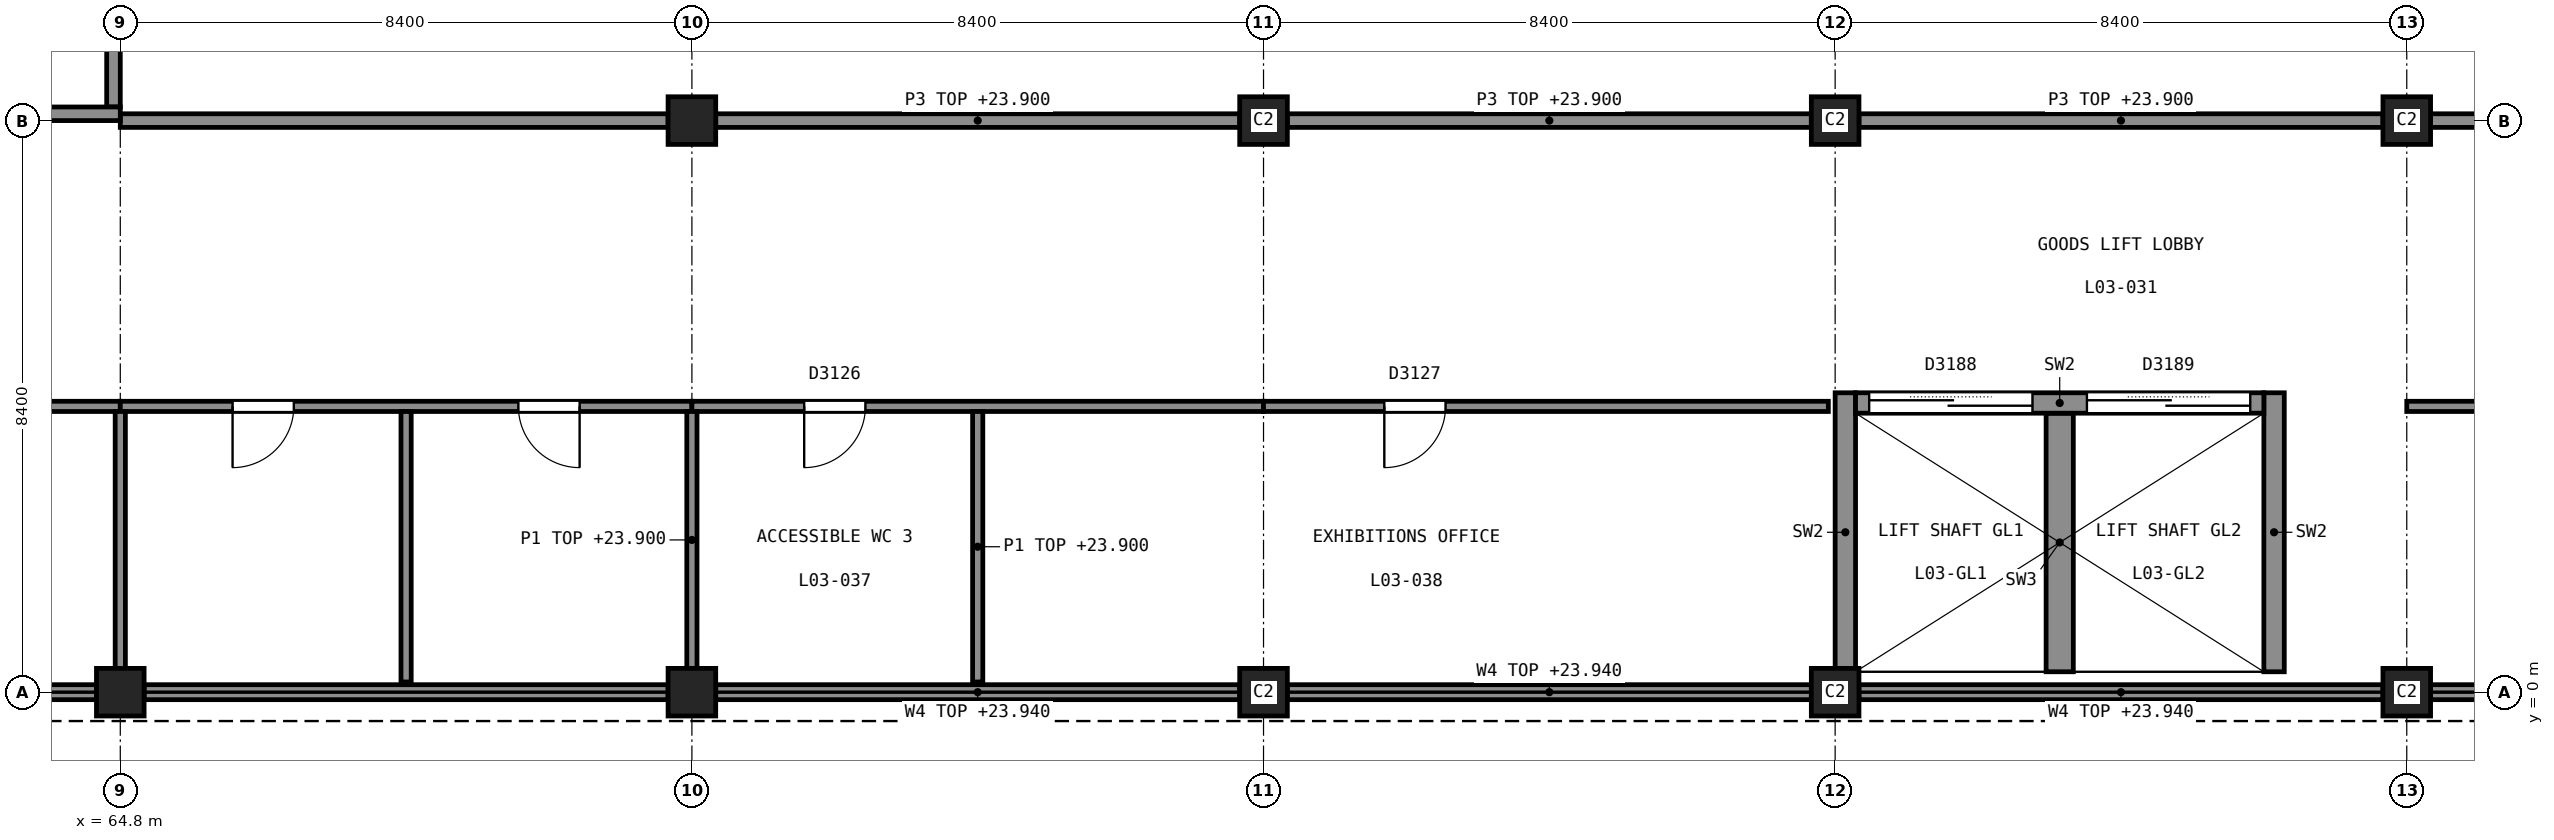
"""IFC4 building model, lengths in metres.
Left out: names, types, materials, properties, quantities, classifications, styles, units other than length and angle.
Written with IfcOpenShell. Run it as: python <this file> out.ifc"""

import sys

from ifc_helpers import new_model, si_unit, direction, frame, frame_2d, origin, origin_2d, place, context, subcontext, project, spatial, rectangle, extrude, element, fill, save


model = new_model("IFC4")
c1 = context("Model", 3, precision=1e-05, world=origin(), true_north=direction((0.0, 1.0)))
c2 = subcontext(c1, "Body", "Model", "MODEL_VIEW")
j1 = project(units=[si_unit("LENGTHUNIT", "METRE"), si_unit("PLANEANGLEUNIT", "RADIAN")], contexts=[c1])
p1 = place(None, origin())
s1 = spatial("IfcSite", under=j1, at=p1, CompositionType="ELEMENT")
p2 = place(p1, origin())
s2 = spatial("IfcBuilding", under=s1, at=p2, CompositionType="ELEMENT")
p3 = place(p2, frame((0.0, 0.0, 20.0)))
s3 = spatial("IfcBuildingStorey", under=s2, at=p3, CompositionType="ELEMENT", Elevation=20.0)
p4 = place(p3, frame((56.4, 8.5, 0.0), z_axis=(0.0, 0.0, 1.0), x_axis=(1.0, 0.0, 0.0)))
e1 = element("IfcWall", 1, at=p4, inside=s3, PredefinedType="SHEAR", context=c2, shape_type="SweptSolid", body=[
    extrude(rectangle(XDim=8.4, YDim=0.2, at=frame_2d((4.2, 0.0))), origin(), (0.0, 0.0, 1.0), 5.0),
])
p5 = place(p4, frame((3.3, 0.0, 0.0)))
e2 = element("IfcOpeningElement", 2, at=p5, cuts=e1, PredefinedType="OPENING", context=c2, shape_type="SweptSolid", body=[
    extrude(rectangle(XDim=1.8, YDim=2.1, at=frame_2d((0.9, 1.05))), frame((0.0, 0.11, 0.0), z_axis=(0.0, -1.0, 0.0), x_axis=(1.0, 0.0, 0.0)), (0.0, 0.0, 1.0), 0.22),
])
p6 = place(p3, frame((64.7, 8.6, 0.0), z_axis=(0.0, 0.0, 1.0), x_axis=(0.0, 1.0, 0.0)))
e3 = element("IfcWall", 3, at=p6, inside=s3, PredefinedType="SHEAR", context=c2, shape_type="SweptSolid", body=[
    extrude(rectangle(XDim=8.0, YDim=0.2, at=frame_2d((4.0, 0.0))), origin(), (0.0, 0.0, 1.0), 5.0),
])
for number, where, z_axis, x_axis in (
    (4, (90.15, 0.3, 0.0), (0.0, 0.0, 1.0), (0.0, 1.0, 0.0)),
    (5, (96.45, 0.3, 0.0), (0.0, 0.0, 1.0), (0.0, 1.0, 0.0)),
):
    element("IfcWall", number, at=place(p3, frame(where, z_axis=z_axis, x_axis=x_axis)), inside=s3, PredefinedType="SHEAR", context=c2, shape_type="SweptSolid", body=[
        extrude(rectangle(XDim=4.1, YDim=0.3, at=frame_2d((2.05, 0.0))), origin(), (0.0, 0.0, 1.0), 5.0),
    ])
p7 = place(p3, frame((90.3, 4.25, 0.0), z_axis=(0.0, 0.0, 1.0), x_axis=(1.0, 0.0, 0.0)))
e6 = element("IfcWall", 6, at=p7, inside=s3, PredefinedType="SHEAR", context=c2, shape_type="SweptSolid", body=[
    extrude(rectangle(XDim=6.0, YDim=0.3, at=frame_2d((3.0, 0.0))), origin(), (0.0, 0.0, 1.0), 5.0),
])
p8 = place(p7, frame((0.2, 0.0, 0.0)))
e7 = element("IfcOpeningElement", 7, at=p8, cuts=e6, PredefinedType="OPENING", context=c2, shape_type="SweptSolid", body=[
    extrude(rectangle(XDim=2.4, YDim=2.4, at=frame_2d((1.2, 1.2))), frame((0.0, 0.16, 0.0), z_axis=(0.0, -1.0, 0.0), x_axis=(1.0, 0.0, 0.0)), (0.0, 0.0, 1.0), 0.32),
])
p9 = place(p7, frame((3.4, 0.0, 0.0)))
e8 = element("IfcOpeningElement", 8, at=p9, cuts=e6, PredefinedType="OPENING", context=c2, shape_type="SweptSolid", body=[
    extrude(rectangle(XDim=2.4, YDim=2.4, at=frame_2d((1.2, 1.2))), frame((0.0, 0.16, 0.0), z_axis=(0.0, -1.0, 0.0), x_axis=(1.0, 0.0, 0.0)), (0.0, 0.0, 1.0), 0.32),
])
p10 = place(p3, frame((93.3, 0.3, 0.0), z_axis=(0.0, 0.0, 1.0), x_axis=(0.0, 1.0, 0.0)))
e9 = element("IfcWall", 9, at=p10, inside=s3, PredefinedType="SHEAR", context=c2, shape_type="SweptSolid", body=[
    extrude(rectangle(XDim=3.8, YDim=0.4, at=frame_2d((1.9, 0.0))), origin(), (0.0, 0.0, 1.0), 5.0),
])
for number, where, z_axis, x_axis in (
    (10, (64.8, 0.0, 0.0), (0.0, 0.0, 1.0), (1.0, 0.0, 0.0)),
    (11, (73.2, 0.0, 0.0), (0.0, 0.0, 1.0), (1.0, 0.0, 0.0)),
    (12, (73.2, 8.4, 0.0), (0.0, 0.0, 1.0), (1.0, 0.0, 0.0)),
    (13, (81.6, 0.0, 0.0), (0.0, 0.0, 1.0), (1.0, 0.0, 0.0)),
    (14, (81.6, 8.4, 0.0), (0.0, 0.0, 1.0), (1.0, 0.0, 0.0)),
    (15, (90.0, 0.0, 0.0), (0.0, 0.0, 1.0), (1.0, 0.0, 0.0)),
    (16, (90.0, 8.4, 0.0), (0.0, 0.0, 1.0), (1.0, 0.0, 0.0)),
    (17, (98.4, 0.0, 0.0), (0.0, 0.0, 1.0), (1.0, 0.0, 0.0)),
    (18, (98.4, 8.4, 0.0), (0.0, 0.0, 1.0), (1.0, 0.0, 0.0)),
):
    element("IfcColumn", number, at=place(p3, frame(where, z_axis=z_axis, x_axis=x_axis)), inside=s3, PredefinedType="COLUMN", context=c2, shape_type="SweptSolid", body=[
        extrude(rectangle(XDim=0.7, YDim=0.7, at=origin_2d()), origin(), (0.0, 0.0, 1.0), 5.0),
    ])
p11 = place(p3, frame((56.75, 0.0, 0.0), z_axis=(0.0, 0.0, 1.0), x_axis=(1.0, 0.0, 0.0)))
e19 = element("IfcWall", 19, at=p11, inside=s3, PredefinedType="SOLIDWALL", context=c2, shape_type="SweptSolid", body=[
    extrude(rectangle(XDim=7.7, YDim=0.22, at=frame_2d((3.85, 0.0))), origin(), (0.0, 0.0, 1.0), 3.94),
])
p12 = place(p3, frame((65.15, 0.0, 0.0), z_axis=(0.0, 0.0, 1.0), x_axis=(1.0, 0.0, 0.0)))
e20 = element("IfcWall", 20, at=p12, inside=s3, PredefinedType="SOLIDWALL", context=c2, shape_type="SweptSolid", body=[
    extrude(rectangle(XDim=7.7, YDim=0.22, at=frame_2d((3.85, 0.0))), origin(), (0.0, 0.0, 1.0), 3.94),
])
for number, where, z_axis, x_axis in (
    (21, (73.55, 0.0, 0.0), (0.0, 0.0, 1.0), (1.0, 0.0, 0.0)),
    (22, (81.95, 0.0, 0.0), (0.0, 0.0, 1.0), (1.0, 0.0, 0.0)),
    (23, (90.35, 0.0, 0.0), (0.0, 0.0, 1.0), (1.0, 0.0, 0.0)),
    (24, (98.75, 0.0, 0.0), (0.0, 0.0, 1.0), (1.0, 0.0, 0.0)),
):
    element("IfcWall", number, at=place(p3, frame(where, z_axis=z_axis, x_axis=x_axis)), inside=s3, PredefinedType="SOLIDWALL", context=c2, shape_type="SweptSolid", body=[
        extrude(rectangle(XDim=7.7, YDim=0.22, at=frame_2d((3.85, 0.0))), origin(), (0.0, 0.0, 1.0), 3.94),
    ])
p13 = place(p3, frame((64.8, 8.4, 0.0), z_axis=(0.0, 0.0, 1.0), x_axis=(1.0, 0.0, 0.0)))
e25 = element("IfcWall", 25, at=p13, inside=s3, PredefinedType="PARTITIONING", context=c2, shape_type="SweptSolid", body=[
    extrude(rectangle(XDim=8.05, YDim=0.2, at=frame_2d((4.025, 0.0))), origin(), (0.0, 0.0, 1.0), 3.9),
])
for number, where, z_axis, x_axis in (
    (26, (73.55, 8.4, 0.0), (0.0, 0.0, 1.0), (1.0, 0.0, 0.0)),
    (27, (81.95, 8.4, 0.0), (0.0, 0.0, 1.0), (1.0, 0.0, 0.0)),
    (28, (90.35, 8.4, 0.0), (0.0, 0.0, 1.0), (1.0, 0.0, 0.0)),
    (29, (98.75, 8.4, 0.0), (0.0, 0.0, 1.0), (1.0, 0.0, 0.0)),
):
    element("IfcWall", number, at=place(p3, frame(where, z_axis=z_axis, x_axis=x_axis)), inside=s3, PredefinedType="PARTITIONING", context=c2, shape_type="SweptSolid", body=[
        extrude(rectangle(XDim=7.7, YDim=0.2, at=frame_2d((3.85, 0.0))), origin(), (0.0, 0.0, 1.0), 3.9),
    ])
p14 = place(p3, frame((98.4, 4.2, 0.0), z_axis=(0.0, 0.0, 1.0), x_axis=(1.0, 0.0, 0.0)))
e30 = element("IfcWall", 30, at=p14, inside=s3, PredefinedType="PARTITIONING", context=c2, shape_type="SweptSolid", body=[
    extrude(rectangle(XDim=8.4, YDim=0.15, at=frame_2d((4.2, 0.0))), origin(), (0.0, 0.0, 1.0), 3.9),
])
p15 = place(p14, frame((5.725, 0.0, 0.0)))
e31 = element("IfcOpeningElement", 31, at=p15, cuts=e30, PredefinedType="OPENING", context=c2, shape_type="SweptSolid", body=[
    extrude(rectangle(XDim=0.9, YDim=2.1, at=frame_2d((0.45, 1.05))), frame((0.0, 0.085, 0.0), z_axis=(0.0, -1.0, 0.0), x_axis=(1.0, 0.0, 0.0)), (0.0, 0.0, 1.0), 0.17),
])
p16 = place(p3, frame((56.4, 4.2, 0.0), z_axis=(0.0, 0.0, 1.0), x_axis=(1.0, 0.0, 0.0)))
e32 = element("IfcWall", 32, at=p16, inside=s3, PredefinedType="PARTITIONING", context=c2, shape_type="SweptSolid", body=[
    extrude(rectangle(XDim=8.4, YDim=0.15, at=frame_2d((4.2, 0.0))), origin(), (0.0, 0.0, 1.0), 3.9),
])
p17 = place(p3, frame((64.8, 4.2, 0.0), z_axis=(0.0, 0.0, 1.0), x_axis=(1.0, 0.0, 0.0)))
e33 = element("IfcWall", 33, at=p17, inside=s3, PredefinedType="PARTITIONING", context=c2, shape_type="SweptSolid", body=[
    extrude(rectangle(XDim=8.4, YDim=0.15, at=frame_2d((4.2, 0.0))), origin(), (0.0, 0.0, 1.0), 3.9),
])
p18 = place(p17, frame((1.65, 0.0, 0.0)))
e34 = element("IfcOpeningElement", 34, at=p18, cuts=e33, PredefinedType="OPENING", context=c2, shape_type="SweptSolid", body=[
    extrude(rectangle(XDim=0.9, YDim=2.1, at=frame_2d((0.45, 1.05))), frame((0.0, 0.085, 0.0), z_axis=(0.0, -1.0, 0.0), x_axis=(1.0, 0.0, 0.0)), (0.0, 0.0, 1.0), 0.17),
])
p19 = place(p17, frame((5.85, 0.0, 0.0)))
e35 = element("IfcOpeningElement", 35, at=p19, cuts=e33, PredefinedType="OPENING", context=c2, shape_type="SweptSolid", body=[
    extrude(rectangle(XDim=0.9, YDim=2.1, at=frame_2d((0.45, 1.05))), frame((0.0, 0.085, 0.0), z_axis=(0.0, -1.0, 0.0), x_axis=(1.0, 0.0, 0.0)), (0.0, 0.0, 1.0), 0.17),
])
p20 = place(p3, frame((73.2, 4.2, 0.0), z_axis=(0.0, 0.0, 1.0), x_axis=(1.0, 0.0, 0.0)))
e36 = element("IfcWall", 36, at=p20, inside=s3, PredefinedType="PARTITIONING", context=c2, shape_type="SweptSolid", body=[
    extrude(rectangle(XDim=8.4, YDim=0.15, at=frame_2d((4.2, 0.0))), origin(), (0.0, 0.0, 1.0), 3.9),
])
p21 = place(p20, frame((1.65, 0.0, 0.0)))
e37 = element("IfcOpeningElement", 37, at=p21, cuts=e36, PredefinedType="OPENING", context=c2, shape_type="SweptSolid", body=[
    extrude(rectangle(XDim=0.9, YDim=2.1, at=frame_2d((0.45, 1.05))), frame((0.0, 0.085, 0.0), z_axis=(0.0, -1.0, 0.0), x_axis=(1.0, 0.0, 0.0)), (0.0, 0.0, 1.0), 0.17),
])
p22 = place(p3, frame((81.6, 4.2, 0.0), z_axis=(0.0, 0.0, 1.0), x_axis=(1.0, 0.0, 0.0)))
e38 = element("IfcWall", 38, at=p22, inside=s3, PredefinedType="PARTITIONING", context=c2, shape_type="SweptSolid", body=[
    extrude(rectangle(XDim=8.3, YDim=0.15, at=frame_2d((4.15, 0.0))), origin(), (0.0, 0.0, 1.0), 3.9),
])
p23 = place(p22, frame((1.775, 0.0, 0.0)))
e39 = element("IfcOpeningElement", 39, at=p23, cuts=e38, PredefinedType="OPENING", context=c2, shape_type="SweptSolid", body=[
    extrude(rectangle(XDim=0.9, YDim=2.1, at=frame_2d((0.45, 1.05))), frame((0.0, 0.085, 0.0), z_axis=(0.0, -1.0, 0.0), x_axis=(1.0, 0.0, 0.0)), (0.0, 0.0, 1.0), 0.17),
])
p24 = place(p3, frame((64.8, 0.35, 0.0), z_axis=(0.0, 0.0, 1.0), x_axis=(0.0, 1.0, 0.0)))
e40 = element("IfcWall", 40, at=p24, inside=s3, PredefinedType="PARTITIONING", context=c2, shape_type="SweptSolid", body=[
    extrude(rectangle(XDim=3.775, YDim=0.15, at=frame_2d((1.887, 0.0))), origin(), (0.0, 0.0, 1.0), 3.9),
])
p25 = place(p3, frame((69.0, 0.15, 0.0), z_axis=(0.0, 0.0, 1.0), x_axis=(0.0, 1.0, 0.0)))
e41 = element("IfcWall", 41, at=p25, inside=s3, PredefinedType="PARTITIONING", context=c2, shape_type="SweptSolid", body=[
    extrude(rectangle(XDim=3.975, YDim=0.15, at=frame_2d((1.988, 0.0))), origin(), (0.0, 0.0, 1.0), 3.9),
])
p26 = place(p3, frame((73.2, 0.35, 0.0), z_axis=(0.0, 0.0, 1.0), x_axis=(0.0, 1.0, 0.0)))
e42 = element("IfcWall", 42, at=p26, inside=s3, PredefinedType="PARTITIONING", context=c2, shape_type="SweptSolid", body=[
    extrude(rectangle(XDim=3.775, YDim=0.15, at=frame_2d((1.887, 0.0))), origin(), (0.0, 0.0, 1.0), 3.9),
])
p27 = place(p3, frame((77.4, 0.15, 0.0), z_axis=(0.0, 0.0, 1.0), x_axis=(0.0, 1.0, 0.0)))
e43 = element("IfcWall", 43, at=p27, inside=s3, PredefinedType="PARTITIONING", context=c2, shape_type="SweptSolid", body=[
    extrude(rectangle(XDim=3.975, YDim=0.15, at=frame_2d((1.988, 0.0))), origin(), (0.0, 0.0, 1.0), 3.9),
])
p28 = place(p18, origin())
e44 = element("IfcDoor", 44, at=p28, inside=s3, OperationType="SINGLE_SWING_LEFT", PredefinedType="DOOR", context=c2, shape_type="SweptSolid", body=[
    extrude(rectangle(XDim=0.9, YDim=2.1, at=frame_2d((0.45, 1.05))), frame((0.0, 0.025, 0.0), z_axis=(0.0, -1.0, 0.0), x_axis=(1.0, 0.0, 0.0)), (0.0, 0.0, 1.0), 0.05),
])
fill(e34, e44)
p29 = place(p19, origin())
e45 = element("IfcDoor", 45, at=p29, inside=s3, OperationType="SINGLE_SWING_RIGHT", PredefinedType="DOOR", context=c2, shape_type="SweptSolid", body=[
    extrude(rectangle(XDim=0.9, YDim=2.1, at=frame_2d((0.45, 1.05))), frame((0.0, 0.025, 0.0), z_axis=(0.0, -1.0, 0.0), x_axis=(1.0, 0.0, 0.0)), (0.0, 0.0, 1.0), 0.05),
])
fill(e35, e45)
p30 = place(p21, origin())
e46 = element("IfcDoor", 46, at=p30, inside=s3, OperationType="SINGLE_SWING_LEFT", PredefinedType="DOOR", context=c2, shape_type="SweptSolid", body=[
    extrude(rectangle(XDim=0.9, YDim=2.1, at=frame_2d((0.45, 1.05))), frame((0.0, 0.025, 0.0), z_axis=(0.0, -1.0, 0.0), x_axis=(1.0, 0.0, 0.0)), (0.0, 0.0, 1.0), 0.05),
])
fill(e37, e46)
p31 = place(p23, origin())
e47 = element("IfcDoor", 47, at=p31, inside=s3, OperationType="SINGLE_SWING_LEFT", PredefinedType="DOOR", context=c2, shape_type="SweptSolid", body=[
    extrude(rectangle(XDim=0.9, YDim=2.1, at=frame_2d((0.45, 1.05))), frame((0.0, 0.025, 0.0), z_axis=(0.0, -1.0, 0.0), x_axis=(1.0, 0.0, 0.0)), (0.0, 0.0, 1.0), 0.05),
])
fill(e39, e47)
p32 = place(p8, origin())
e48 = element("IfcDoor", 48, at=p32, inside=s3, OperationType="DOUBLE_DOOR_SLIDING", PredefinedType="DOOR", context=c2, shape_type="SweptSolid", body=[
    extrude(rectangle(XDim=2.4, YDim=2.4, at=frame_2d((1.2, 1.2))), frame((0.0, 0.025, 0.0), z_axis=(0.0, -1.0, 0.0), x_axis=(1.0, 0.0, 0.0)), (0.0, 0.0, 1.0), 0.05),
])
fill(e7, e48)
p33 = place(p9, origin())
e49 = element("IfcDoor", 49, at=p33, inside=s3, OperationType="DOUBLE_DOOR_SLIDING", PredefinedType="DOOR", context=c2, shape_type="SweptSolid", body=[
    extrude(rectangle(XDim=2.4, YDim=2.4, at=frame_2d((1.2, 1.2))), frame((0.0, 0.025, 0.0), z_axis=(0.0, -1.0, 0.0), x_axis=(1.0, 0.0, 0.0)), (0.0, 0.0, 1.0), 0.05),
])
fill(e8, e49)
save(model, sys.argv[1])
